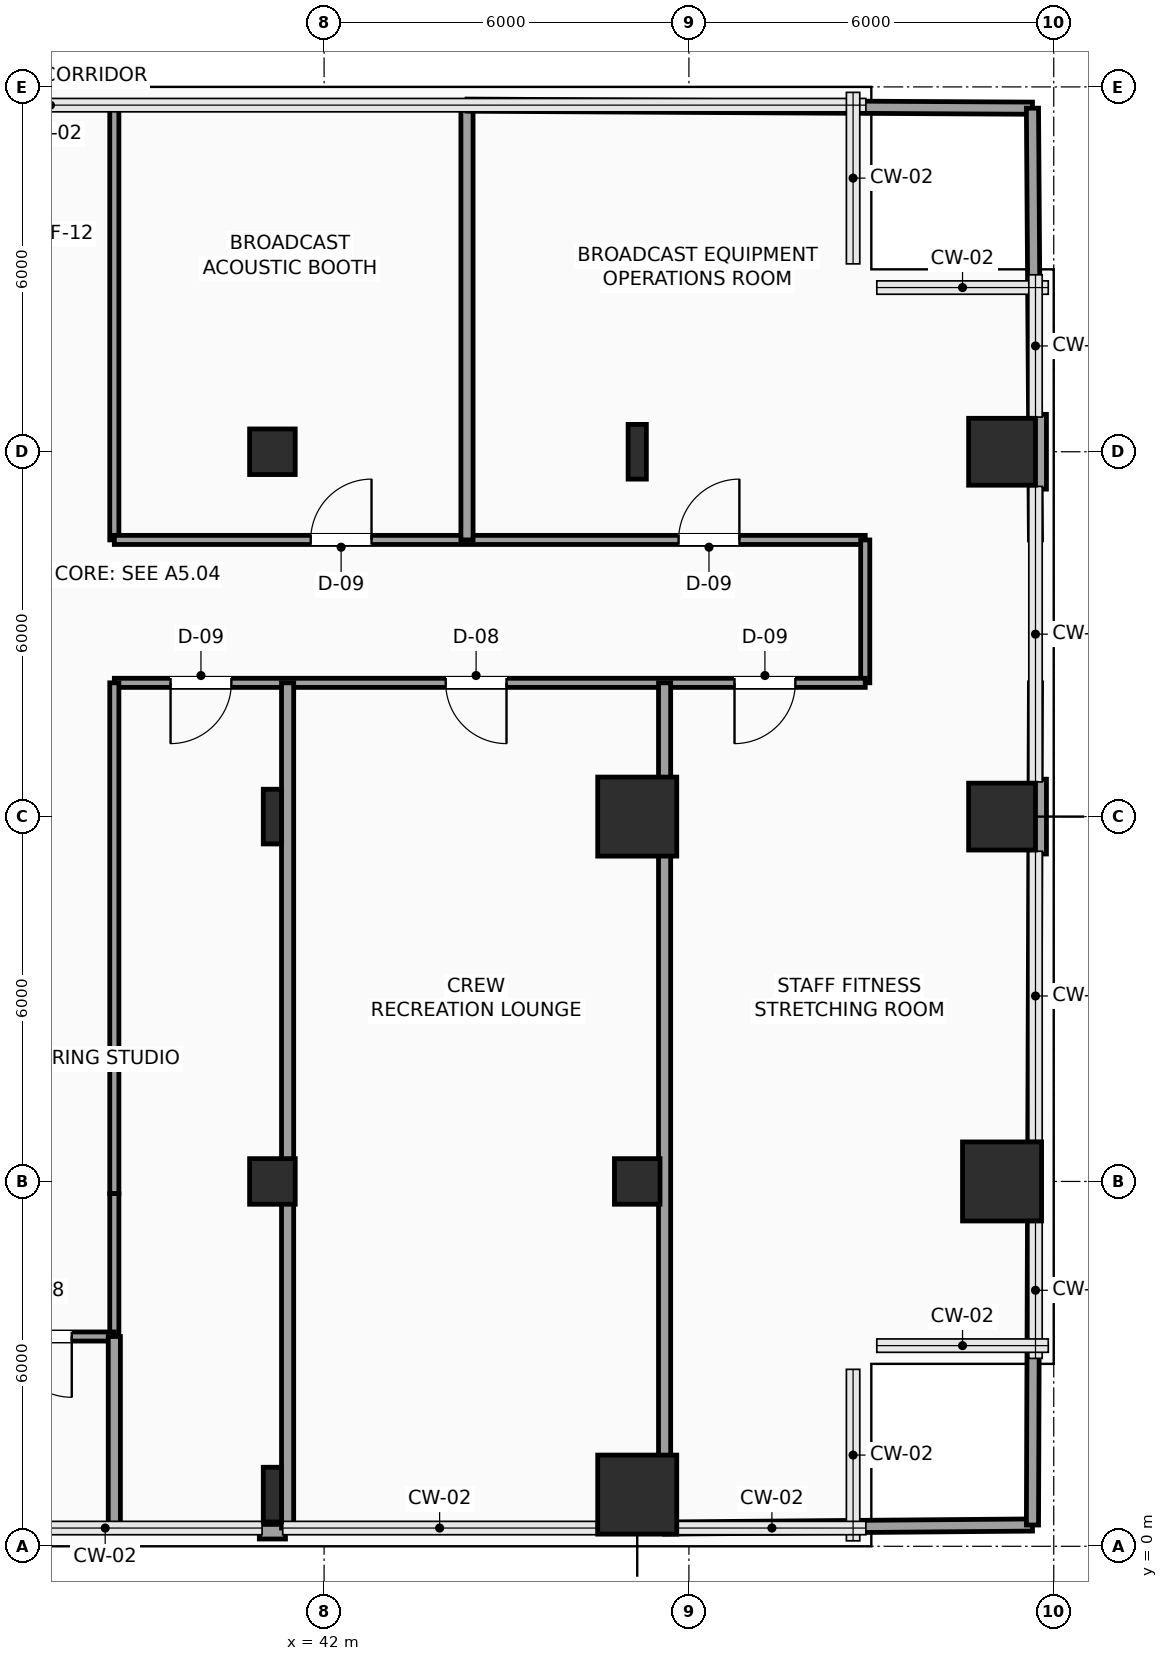
"""IFC4 building model, lengths in metres.
Left out: names, types, materials, properties, quantities, classifications, styles, units other than length and angle.
Written with IfcOpenShell. Run it as: python <this file> out.ifc"""

import sys

from ifc_helpers import new_model, si_unit, direction, frame, frame_2d, origin, origin_2d, place, context, subcontext, project, spatial, rectangle, hollow_rectangle, i_section, extrude, element, fill, save


model = new_model("IFC4")
c1 = context("Model", 3, precision=1e-05, world=origin(), true_north=direction((0.0, 1.0)))
c2 = subcontext(c1, "Body", "Model", "MODEL_VIEW")
j1 = project(units=[si_unit("LENGTHUNIT", "METRE"), si_unit("PLANEANGLEUNIT", "RADIAN")], contexts=[c1])
p1 = place(None, origin())
s1 = spatial("IfcSite", under=j1, at=p1, CompositionType="ELEMENT")
p2 = place(p1, origin())
s2 = spatial("IfcBuilding", under=s1, at=p2, CompositionType="ELEMENT")
p3 = place(p2, frame((0.0, 0.0, 67.5)))
s3 = spatial("IfcBuildingStorey", under=s2, at=p3, CompositionType="ELEMENT", Elevation=67.5)
p4 = place(p3, frame((41.15, 0.85, 0.0), z_axis=(0.0, 0.0, 1.0), x_axis=(1.0, 0.0, 0.0)))
e1 = element("IfcColumn", 1, at=p4, inside=s3, PredefinedType="COLUMN", context=c2, shape_type="SweptSolid", body=[
    extrude(i_section(OverallWidth=0.3, OverallDepth=0.9, WebThickness=0.019, FlangeThickness=0.035, FilletRadius=0.03, at=origin_2d()), origin(), (0.0, 0.0, 1.0), 3.9),
])
p5 = place(p3, frame((41.15, 6.0, 0.0), z_axis=(0.0, 0.0, 1.0), x_axis=(1.0, 0.0, 0.0)))
e2 = element("IfcColumn", 2, at=p5, inside=s3, PredefinedType="COLUMN", context=c2, shape_type="SweptSolid", body=[
    extrude(hollow_rectangle(XDim=0.75, YDim=0.75, WallThickness=0.035, InnerFilletRadius=0.035, OuterFilletRadius=0.05, at=origin_2d()), origin(), (0.0, 0.0, 1.0), 3.9),
])
p6 = place(p3, frame((41.15, 12.0, 0.0), z_axis=(0.0, 0.0, 1.0), x_axis=(1.0, 0.0, 0.0)))
e3 = element("IfcColumn", 3, at=p6, inside=s3, PredefinedType="COLUMN", context=c2, shape_type="SweptSolid", body=[
    extrude(i_section(OverallWidth=0.3, OverallDepth=0.9, WebThickness=0.019, FlangeThickness=0.035, FilletRadius=0.03, at=origin_2d()), origin(), (0.0, 0.0, 1.0), 3.9),
])
p7 = place(p3, frame((41.15, 18.0, 0.0), z_axis=(0.0, 0.0, 1.0), x_axis=(1.0, 0.0, 0.0)))
e4 = element("IfcColumn", 4, at=p7, inside=s3, PredefinedType="COLUMN", context=c2, shape_type="SweptSolid", body=[
    extrude(hollow_rectangle(XDim=0.75, YDim=0.75, WallThickness=0.035, InnerFilletRadius=0.035, OuterFilletRadius=0.05, at=origin_2d()), origin(), (0.0, 0.0, 1.0), 3.9),
])
p8 = place(p3, frame((47.15, 0.85, 0.0), z_axis=(0.0, 0.0, 1.0), x_axis=(1.0, 0.0, 0.0)))
e5 = element("IfcColumn", 5, at=p8, inside=s3, PredefinedType="COLUMN", context=c2, shape_type="SweptSolid", body=[
    extrude(rectangle(XDim=1.3, YDim=1.3, at=origin_2d()), origin(), (0.0, 0.0, 1.0), 3.9),
])
p9 = place(p3, frame((47.15, 6.0, 0.0), z_axis=(0.0, 0.0, 1.0), x_axis=(1.0, 0.0, 0.0)))
e6 = element("IfcColumn", 6, at=p9, inside=s3, PredefinedType="COLUMN", context=c2, shape_type="SweptSolid", body=[
    extrude(hollow_rectangle(XDim=0.75, YDim=0.75, WallThickness=0.035, InnerFilletRadius=0.035, OuterFilletRadius=0.05, at=origin_2d()), origin(), (0.0, 0.0, 1.0), 3.9),
])
p10 = place(p3, frame((47.15, 12.0, 0.0), z_axis=(0.0, 0.0, 1.0), x_axis=(1.0, 0.0, 0.0)))
e7 = element("IfcColumn", 7, at=p10, inside=s3, PredefinedType="COLUMN", context=c2, shape_type="SweptSolid", body=[
    extrude(rectangle(XDim=1.3, YDim=1.3, at=origin_2d()), origin(), (0.0, 0.0, 1.0), 3.9),
])
p11 = place(p3, frame((47.15, 18.0, 0.0), z_axis=(0.0, 0.0, 1.0), x_axis=(1.0, 0.0, 0.0)))
e8 = element("IfcColumn", 8, at=p11, inside=s3, PredefinedType="COLUMN", context=c2, shape_type="SweptSolid", body=[
    extrude(i_section(OverallWidth=0.3, OverallDepth=0.9, WebThickness=0.019, FlangeThickness=0.035, FilletRadius=0.03, at=origin_2d()), origin(), (0.0, 0.0, 1.0), 3.9),
])
p12 = place(p3, frame((53.15, 6.0, 0.0), z_axis=(0.0, 0.0, 1.0), x_axis=(1.0, 0.0, 0.0)))
e9 = element("IfcColumn", 9, at=p12, inside=s3, PredefinedType="COLUMN", context=c2, shape_type="SweptSolid", body=[
    extrude(rectangle(XDim=1.3, YDim=1.3, at=origin_2d()), origin(), (0.0, 0.0, 1.0), 3.9),
])
for number, where, z_axis, x_axis in (
    (10, (53.15, 12.0, 0.0), (0.0, 0.0, 1.0), (1.0, 0.0, 0.0)),
    (11, (53.15, 18.0, 0.0), (0.0, 0.0, 1.0), (1.0, 0.0, 0.0)),
):
    element("IfcColumn", number, at=place(p3, frame(where, z_axis=z_axis, x_axis=x_axis)), inside=s3, PredefinedType="COLUMN", context=c2, shape_type="SweptSolid", body=[
        extrude(rectangle(XDim=1.1, YDim=1.1, at=origin_2d()), origin(), (0.0, 0.0, 1.0), 3.9),
    ])
for number, where, z_axis, x_axis in (
    (12, (53.76, 18.615, 0.0), (0.0, 0.0, 1.0), (0.0, -1.0, 0.0)),
    (13, (53.76, 12.615, 0.0), (0.0, 0.0, 1.0), (0.0, -1.0, 0.0)),
):
    element("IfcWall", number, at=place(p3, frame(where, z_axis=z_axis, x_axis=x_axis)), inside=s3, PredefinedType="SOLIDWALL", context=c2, shape_type="SweptSolid", body=[
        extrude(rectangle(XDim=1.23, YDim=0.24, at=frame_2d((0.615, 0.0))), origin(), (0.0, 0.0, 1.0), 3.65),
    ])
p13 = place(p3, frame((41.365, 0.24, 0.0), z_axis=(0.0, 0.0, 1.0), x_axis=(-1.0, 0.0, 0.0)))
e14 = element("IfcWall", 14, at=p13, inside=s3, PredefinedType="SOLIDWALL", context=c2, shape_type="SweptSolid", body=[
    extrude(rectangle(XDim=0.43, YDim=0.24, at=frame_2d((0.215, 0.0))), origin(), (0.0, 0.0, 1.0), 3.65),
])
p14 = place(p3, frame((38.55, 23.7, 0.0), z_axis=(0.0, 0.0, 1.0), x_axis=(0.0, -1.0, 0.0)))
e15 = element("IfcWall", 15, at=p14, inside=s3, PredefinedType="PARTITIONING", context=c2, shape_type="SweptSolid", body=[
    extrude(rectangle(XDim=7.15, YDim=0.15, at=frame_2d((3.575, 0.0))), origin(), (0.0, 0.0, 1.0), 3.65),
])
p15 = place(p3, frame((38.55, 16.55, 0.0), z_axis=(0.0, 0.0, 1.0), x_axis=(1.0, 0.0, 0.0)))
e16 = element("IfcWall", 16, at=p15, inside=s3, PredefinedType="PARTITIONING", context=c2, shape_type="SweptSolid", body=[
    extrude(rectangle(XDim=12.35, YDim=0.15, at=frame_2d((6.175, 0.0))), origin(), (0.0, 0.0, 1.0), 3.65),
])
p16 = place(p15, frame((3.23, 0.0, 0.0)))
e17 = element("IfcOpeningElement", 17, at=p16, cuts=e16, PredefinedType="OPENING", context=c2, shape_type="SweptSolid", body=[
    extrude(rectangle(XDim=1.0, YDim=2.2, at=frame_2d((0.5, 1.1))), frame((0.0, 0.085, 0.0), z_axis=(0.0, -1.0, 0.0), x_axis=(1.0, 0.0, 0.0)), (0.0, 0.0, 1.0), 0.17),
])
p17 = place(p15, frame((9.28, 0.0, 0.0)))
e18 = element("IfcOpeningElement", 18, at=p17, cuts=e16, PredefinedType="OPENING", context=c2, shape_type="SweptSolid", body=[
    extrude(rectangle(XDim=1.0, YDim=2.2, at=frame_2d((0.5, 1.1))), frame((0.0, 0.085, 0.0), z_axis=(0.0, -1.0, 0.0), x_axis=(1.0, 0.0, 0.0)), (0.0, 0.0, 1.0), 0.17),
])
p18 = place(p3, frame((50.9, 16.55, 0.0), z_axis=(0.0, 0.0, 1.0), x_axis=(0.0, -1.0, 0.0)))
e19 = element("IfcWall", 19, at=p18, inside=s3, PredefinedType="PARTITIONING", context=c2, shape_type="SweptSolid", body=[
    extrude(rectangle(XDim=2.35, YDim=0.15, at=frame_2d((1.175, 0.0))), origin(), (0.0, 0.0, 1.0), 3.65),
])
p19 = place(p3, frame((50.9, 14.2, 0.0), z_axis=(0.0, 0.0, 1.0), x_axis=(-1.0, 0.0, 0.0)))
e20 = element("IfcWall", 20, at=p19, inside=s3, PredefinedType="PARTITIONING", context=c2, shape_type="SweptSolid", body=[
    extrude(rectangle(XDim=12.35, YDim=0.15, at=frame_2d((6.175, 0.0))), origin(), (0.0, 0.0, 1.0), 3.65),
])
p20 = place(p19, frame((10.425, 0.0, 0.0)))
e21 = element("IfcOpeningElement", 21, at=p20, cuts=e20, PredefinedType="OPENING", context=c2, shape_type="SweptSolid", body=[
    extrude(rectangle(XDim=1.0, YDim=2.2, at=frame_2d((0.5, 1.1))), frame((0.0, 0.085, 0.0), z_axis=(0.0, -1.0, 0.0), x_axis=(1.0, 0.0, 0.0)), (0.0, 0.0, 1.0), 0.17),
])
p21 = place(p19, frame((5.9, 0.0, 0.0)))
e22 = element("IfcOpeningElement", 22, at=p21, cuts=e20, PredefinedType="OPENING", context=c2, shape_type="SweptSolid", body=[
    extrude(rectangle(XDim=1.0, YDim=2.2, at=frame_2d((0.5, 1.1))), frame((0.0, 0.085, 0.0), z_axis=(0.0, -1.0, 0.0), x_axis=(1.0, 0.0, 0.0)), (0.0, 0.0, 1.0), 0.17),
])
p22 = place(p19, frame((1.15, 0.0, 0.0)))
e23 = element("IfcOpeningElement", 23, at=p22, cuts=e20, PredefinedType="OPENING", context=c2, shape_type="SweptSolid", body=[
    extrude(rectangle(XDim=1.0, YDim=2.2, at=frame_2d((0.5, 1.1))), frame((0.0, 0.085, 0.0), z_axis=(0.0, -1.0, 0.0), x_axis=(1.0, 0.0, 0.0)), (0.0, 0.0, 1.0), 0.17),
])
p23 = place(p3, frame((38.55, 14.2, 0.0), z_axis=(0.0, 0.0, 1.0), x_axis=(0.0, -1.0, 0.0)))
e24 = element("IfcWall", 24, at=p23, inside=s3, PredefinedType="PARTITIONING", context=c2, shape_type="SweptSolid", body=[
    extrude(rectangle(XDim=8.4, YDim=0.15, at=frame_2d((4.2, 0.0))), origin(), (0.0, 0.0, 1.0), 3.65),
])
p24 = place(p3, frame((38.55, 5.8, 0.0), z_axis=(0.0, 0.0, 1.0), x_axis=(0.0, -1.0, 0.0)))
e25 = element("IfcWall", 25, at=p24, inside=s3, PredefinedType="PARTITIONING", context=c2, shape_type="SweptSolid", body=[
    extrude(rectangle(XDim=2.35, YDim=0.15, at=frame_2d((1.175, 0.0))), origin(), (0.0, 0.0, 1.0), 3.65),
])
p25 = place(p3, frame((38.55, 3.45, 0.0), z_axis=(0.0, 0.0, 1.0), x_axis=(-1.0, 0.0, 0.0)))
e26 = element("IfcWall", 26, at=p25, inside=s3, PredefinedType="PARTITIONING", context=c2, shape_type="SweptSolid", body=[
    extrude(rectangle(XDim=2.4, YDim=0.15, at=frame_2d((1.2, 0.0))), origin(), (0.0, 0.0, 1.0), 3.142),
])
p26 = place(p25, frame((0.7, 0.0, 0.0)))
e27 = element("IfcOpeningElement", 27, at=p26, cuts=e26, PredefinedType="OPENING", context=c2, shape_type="SweptSolid", body=[
    extrude(rectangle(XDim=1.0, YDim=2.2, at=frame_2d((0.5, 1.1))), frame((0.0, 0.085, 0.0), z_axis=(0.0, -1.0, 0.0), x_axis=(1.0, 0.0, 0.0)), (0.0, 0.0, 1.0), 0.17),
])
p27 = place(p3, frame((41.4, 0.3, 0.0), z_axis=(0.0, 0.0, 1.0), x_axis=(0.0, 1.0, 0.0)))
e28 = element("IfcWall", 28, at=p27, inside=s3, PredefinedType="PARTITIONING", context=c2, shape_type="SweptSolid", body=[
    extrude(rectangle(XDim=13.9, YDim=0.2, at=frame_2d((6.95, 0.0))), origin(), (0.0, 0.0, 1.0), 2.992),
])
p28 = place(p3, frame((47.6, 0.3, 0.0), z_axis=(0.0, 0.0, 1.0), x_axis=(0.0, 1.0, 0.0)))
e29 = element("IfcWall", 29, at=p28, inside=s3, PredefinedType="PARTITIONING", context=c2, shape_type="SweptSolid", body=[
    extrude(rectangle(XDim=13.9, YDim=0.2, at=frame_2d((6.95, 0.0))), origin(), (0.0, 0.0, 1.0), 3.65),
])
p29 = place(p3, frame((47.6, 0.3, 0.0), z_axis=(0.0, 0.0, 1.0), x_axis=(0.999965782141, 0.008272517568, 0.0)))
e30 = element("IfcWall", 30, at=p29, inside=s3, PredefinedType="PARTITIONING", context=c2, shape_type="SweptSolid", body=[
    extrude(rectangle(XDim=6.05, YDim=0.2, at=frame_2d((3.025, 0.0))), origin(), (0.0, 0.0, 1.0), 3.65),
])
p30 = place(p3, frame((53.65, 0.35, 0.0), z_axis=(0.0, 0.0, 1.0), x_axis=(0.003606251025, 0.999993497456, 0.0)))
e31 = element("IfcWall", 31, at=p30, inside=s3, PredefinedType="PARTITIONING", context=c2, shape_type="SweptSolid", body=[
    extrude(rectangle(XDim=11.035, YDim=0.2, at=frame_2d((5.518, 0.0))), origin(), (0.0, 0.0, 1.0), 3.65),
])
p31 = place(p3, frame((53.694, 12.615, 0.0), z_axis=(0.0, 0.0, 1.0), x_axis=(0.003542799701, 0.999993724265, 0.0)))
e32 = element("IfcWall", 32, at=p31, inside=s3, PredefinedType="PARTITIONING", context=c2, shape_type="SweptSolid", body=[
    extrude(rectangle(XDim=1.585, YDim=0.2, at=frame_2d((0.792, 0.0))), origin(), (0.0, 0.0, 1.0), 3.65),
])
p32 = place(p3, frame((44.35, 16.55, 0.0), z_axis=(0.0, 0.0, 1.0), x_axis=(0.0, 1.0, 0.0)))
e33 = element("IfcWall", 33, at=p32, inside=s3, PredefinedType="PARTITIONING", context=c2, shape_type="SweptSolid", body=[
    extrude(rectangle(XDim=7.15, YDim=0.2, at=frame_2d((3.575, 0.0))), origin(), (0.0, 0.0, 1.0), 3.65),
])
p33 = place(p3, frame((44.35, 23.7, 0.0), z_axis=(0.0, 0.0, 1.0), x_axis=(0.999985518927, -0.005381629512, 0.0)))
e34 = element("IfcWall", 34, at=p33, inside=s3, PredefinedType="PARTITIONING", context=c2, shape_type="SweptSolid", body=[
    extrude(rectangle(XDim=9.3, YDim=0.2, at=frame_2d((4.65, 0.0))), origin(), (0.0, 0.0, 1.0), 3.65),
])
p34 = place(p3, frame((53.7, 16.55, 0.0), z_axis=(0.0, 0.0, 1.0), x_axis=(-0.007017371073, 0.999975377948, 0.0)))
e35 = element("IfcWall", 35, at=p34, inside=s3, PredefinedType="PARTITIONING", context=c2, shape_type="SweptSolid", body=[
    extrude(rectangle(XDim=0.835, YDim=0.2, at=frame_2d((0.417, 0.0))), origin(), (0.0, 0.0, 1.0), 3.65),
])
p35 = place(p3, frame((53.686, 18.615, 0.0), z_axis=(0.0, 0.0, 1.0), x_axis=(-0.007079296972, 0.999974941463, 0.0)))
e36 = element("IfcWall", 36, at=p35, inside=s3, PredefinedType="PARTITIONING", context=c2, shape_type="SweptSolid", body=[
    extrude(rectangle(XDim=5.035, YDim=0.2, at=frame_2d((2.518, 0.0))), origin(), (0.0, 0.0, 1.0), 3.65),
])
p36 = place(p3, frame((38.55, 0.3, 0.0), z_axis=(0.0, 0.0, 1.0), x_axis=(0.0, 1.0, 0.0)))
e37 = element("IfcWall", 37, at=p36, inside=s3, PredefinedType="PARTITIONING", context=c2, shape_type="SweptSolid", body=[
    extrude(rectangle(XDim=3.15, YDim=0.2, at=frame_2d((1.575, 0.0))), origin(), (0.0, 0.0, 1.0), 3.65),
])
p37 = place(p16, origin())
e38 = element("IfcDoor", 38, at=p37, inside=s3, OperationType="SINGLE_SWING_RIGHT", PredefinedType="DOOR", context=c2, shape_type="SweptSolid", body=[
    extrude(rectangle(XDim=1.0, YDim=2.2, at=frame_2d((0.5, 1.1))), frame((0.0, 0.025, 0.0), z_axis=(0.0, -1.0, 0.0), x_axis=(1.0, 0.0, 0.0)), (0.0, 0.0, 1.0), 0.05),
])
fill(e17, e38)
p38 = place(p17, origin())
e39 = element("IfcDoor", 39, at=p38, inside=s3, OperationType="SINGLE_SWING_RIGHT", PredefinedType="DOOR", context=c2, shape_type="SweptSolid", body=[
    extrude(rectangle(XDim=1.0, YDim=2.2, at=frame_2d((0.5, 1.1))), frame((0.0, 0.025, 0.0), z_axis=(0.0, -1.0, 0.0), x_axis=(1.0, 0.0, 0.0)), (0.0, 0.0, 1.0), 0.05),
])
fill(e18, e39)
p39 = place(p20, origin())
e40 = element("IfcDoor", 40, at=p39, inside=s3, OperationType="SINGLE_SWING_RIGHT", PredefinedType="DOOR", context=c2, shape_type="SweptSolid", body=[
    extrude(rectangle(XDim=1.0, YDim=2.2, at=frame_2d((0.5, 1.1))), frame((0.0, 0.025, 0.0), z_axis=(0.0, -1.0, 0.0), x_axis=(1.0, 0.0, 0.0)), (0.0, 0.0, 1.0), 0.05),
])
fill(e21, e40)
p40 = place(p21, origin())
e41 = element("IfcDoor", 41, at=p40, inside=s3, OperationType="SINGLE_SWING_LEFT", PredefinedType="DOOR", context=c2, shape_type="SweptSolid", body=[
    extrude(rectangle(XDim=1.0, YDim=2.2, at=frame_2d((0.5, 1.1))), frame((0.0, 0.025, 0.0), z_axis=(0.0, -1.0, 0.0), x_axis=(1.0, 0.0, 0.0)), (0.0, 0.0, 1.0), 0.05),
])
fill(e22, e41)
p41 = place(p22, origin())
e42 = element("IfcDoor", 42, at=p41, inside=s3, OperationType="SINGLE_SWING_RIGHT", PredefinedType="DOOR", context=c2, shape_type="SweptSolid", body=[
    extrude(rectangle(XDim=1.0, YDim=2.2, at=frame_2d((0.5, 1.1))), frame((0.0, 0.025, 0.0), z_axis=(0.0, -1.0, 0.0), x_axis=(1.0, 0.0, 0.0)), (0.0, 0.0, 1.0), 0.05),
])
fill(e23, e42)
p42 = place(p26, origin())
e43 = element("IfcDoor", 43, at=p42, inside=s3, OperationType="SINGLE_SWING_LEFT", PredefinedType="DOOR", context=c2, shape_type="SweptSolid", body=[
    extrude(rectangle(XDim=1.0, YDim=2.2, at=frame_2d((0.5, 1.1))), frame((0.0, 0.025, 0.0), z_axis=(0.0, -1.0, 0.0), x_axis=(1.0, 0.0, 0.0)), (0.0, 0.0, 1.0), 0.05),
])
fill(e27, e43)
save(model, sys.argv[1])
